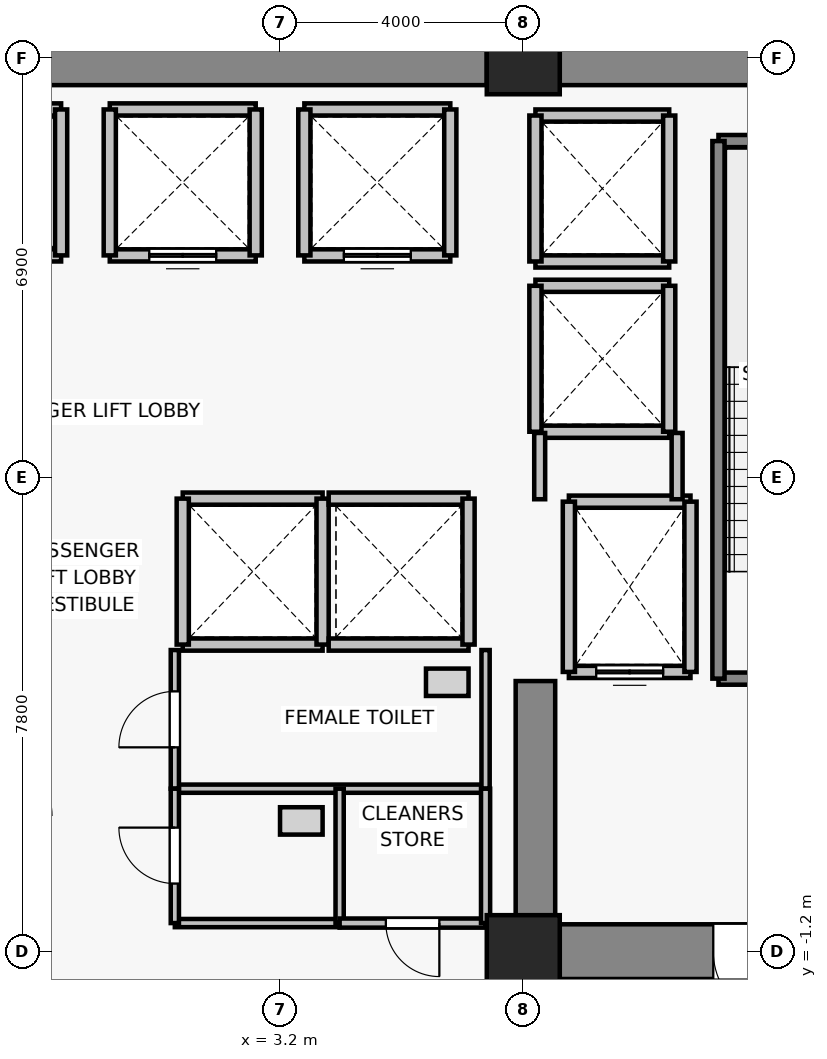
"""IFC4 building model, lengths in metres.
Left out: names, types, materials, properties, quantities, classifications, styles, units other than length and angle.
Written with IfcOpenShell. Run it as: python <this file> out.ifc"""

import sys

from ifc_helpers import new_model, si_unit, direction, frame, frame_2d, origin, origin_2d, place, context, subcontext, project, spatial, rectangle, extrude, source, transform, mapped, element, fill, save


model = new_model("IFC4")
c1 = context("Model", 3, precision=1e-05, world=origin(), true_north=direction((0.0, 1.0)))
c2 = subcontext(c1, "Body", "Model", "MODEL_VIEW")
j1 = project(units=[si_unit("LENGTHUNIT", "METRE"), si_unit("PLANEANGLEUNIT", "RADIAN")], contexts=[c1])
p1 = place(None, origin())
s1 = spatial("IfcSite", under=j1, at=p1, CompositionType="ELEMENT")
p2 = place(p1, origin())
s2 = spatial("IfcBuilding", under=s1, at=p2, CompositionType="ELEMENT")
p3 = place(p2, frame((0.0, 0.0, 18.2)))
s3 = spatial("IfcBuildingStorey", under=s2, at=p3, CompositionType="ELEMENT", Elevation=18.2)
for number, where, z_axis, x_axis in (
    (1, (7.2, -1.2, 0.0), (0.0, 0.0, 1.0), (1.0, 0.0, 0.0)),
    (2, (7.2, 13.5, 0.0), (0.0, 0.0, 1.0), (1.0, 0.0, 0.0)),
):
    element("IfcColumn", number, at=place(p3, frame(where, z_axis=z_axis, x_axis=x_axis)), inside=s3, PredefinedType="COLUMN", context=c2, shape_type="SweptSolid", body=[
        extrude(rectangle(XDim=1.2, YDim=1.2, at=origin_2d()), origin(), (0.0, 0.0, 1.0), 4.4),
    ])
p4 = place(p3, frame((-6.6, 13.5, 0.0), z_axis=(0.0, 0.0, 1.0), x_axis=(1.0, 0.0, 0.0)))
e3 = element("IfcWall", 3, at=p4, inside=s3, PredefinedType="SHEAR", context=c2, shape_type="SweptSolid", body=[
    extrude(rectangle(XDim=13.2, YDim=0.9, at=frame_2d((6.6, 0.0))), origin(), (0.0, 0.0, 1.0), 4.1),
])
p5 = place(p3, frame((7.8, 13.5, 0.0), z_axis=(0.0, 0.0, 1.0), x_axis=(1.0, 0.0, 0.0)))
e4 = element("IfcWall", 4, at=p5, inside=s3, PredefinedType="SHEAR", context=c2, shape_type="SweptSolid", body=[
    extrude(rectangle(XDim=6.0, YDim=0.9, at=frame_2d((3.0, 0.0))), origin(), (0.0, 0.0, 1.0), 4.1),
])
p6 = place(p3, frame((13.8, -1.2, 0.0), z_axis=(0.0, 0.0, 1.0), x_axis=(-1.0, 0.0, 0.0)))
e5 = element("IfcWall", 5, at=p6, inside=s3, PredefinedType="SHEAR", context=c2, shape_type="SweptSolid", body=[
    extrude(rectangle(XDim=6.0, YDim=0.9, at=frame_2d((3.0, 0.0))), origin(), (0.0, 0.0, 1.0), 4.1),
])
p7 = place(p6, frame((2.325, 0.0, 0.0)))
e6 = element("IfcOpeningElement", 6, at=p7, cuts=e5, PredefinedType="OPENING", context=c2, shape_type="SweptSolid", body=[
    extrude(rectangle(XDim=1.15, YDim=2.15, at=frame_2d((0.575, 1.075))), frame((0.0, 0.46, 0.0), z_axis=(0.0, -1.0, 0.0), x_axis=(1.0, 0.0, 0.0)), (0.0, 0.0, 1.0), 0.92),
])
p8 = place(p3, frame((7.4, -0.75, 0.0), z_axis=(0.0, 0.0, 1.0), x_axis=(0.0, 1.0, 0.0)))
e7 = element("IfcWall", 7, at=p8, inside=s3, PredefinedType="SHEAR", context=c2, shape_type="SweptSolid", body=[
    extrude(rectangle(XDim=4.0, YDim=0.65, at=frame_2d((2.0, 0.0))), origin(), (0.0, 0.0, 1.0), 4.1),
])
p9 = place(p3, frame((9.95, 3.4, 0.0), z_axis=(0.0, 0.0, 1.0), x_axis=(-1.0, 0.0, 0.0)))
e8 = element("IfcWall", 8, at=p9, inside=s3, PredefinedType="SOLIDWALL", context=c2, shape_type="SweptSolid", body=[
    extrude(rectangle(XDim=2.0, YDim=0.2, at=frame_2d((1.0, 0.0))), origin(), (0.0, 0.0, 1.0), 4.1),
])
p10 = place(p9, frame((0.45, 0.0, 0.0)))
e9 = element("IfcOpeningElement", 9, at=p10, cuts=e8, PredefinedType="OPENING", context=c2, shape_type="SweptSolid", body=[
    extrude(rectangle(XDim=1.1, YDim=2.2, at=frame_2d((0.55, 1.1))), frame((0.0, 0.11, 0.0), z_axis=(0.0, -1.0, 0.0), x_axis=(1.0, 0.0, 0.0)), (0.0, 0.0, 1.0), 0.22),
])
p11 = place(p3, frame((7.95, 6.2, 0.0), z_axis=(0.0, 0.0, 1.0), x_axis=(1.0, 0.0, 0.0)))
e10 = element("IfcWall", 10, at=p11, inside=s3, PredefinedType="SOLIDWALL", context=c2, shape_type="SweptSolid", body=[
    extrude(rectangle(XDim=2.0, YDim=0.2, at=frame_2d((1.0, 0.0))), origin(), (0.0, 0.0, 1.0), 4.1),
])
for number, where, z_axis, x_axis in (
    (11, (7.95, 3.4, 0.0), (0.0, 0.0, 1.0), (0.0, 1.0, 0.0)),
    (12, (9.95, 6.2, 0.0), (0.0, 0.0, 1.0), (0.0, -1.0, 0.0)),
):
    element("IfcWall", number, at=place(p3, frame(where, z_axis=z_axis, x_axis=x_axis)), inside=s3, PredefinedType="SOLIDWALL", context=c2, shape_type="SweptSolid", body=[
        extrude(rectangle(XDim=2.8, YDim=0.2, at=frame_2d((1.4, 0.0))), origin(), (0.0, 0.0, 1.0), 4.1),
    ])
p12 = place(p3, frame((-0.4, 10.25, 0.0), z_axis=(0.0, 0.0, 1.0), x_axis=(-1.0, 0.0, 0.0)))
e13 = element("IfcWall", 13, at=p12, inside=s3, PredefinedType="SOLIDWALL", context=c2, shape_type="SweptSolid", body=[
    extrude(rectangle(XDim=2.4, YDim=0.2, at=frame_2d((1.2, 0.0))), origin(), (0.0, 0.0, 1.0), 4.1),
])
p13 = place(p12, frame((0.65, 0.0, 0.0)))
e14 = element("IfcOpeningElement", 14, at=p13, cuts=e13, PredefinedType="OPENING", context=c2, shape_type="SweptSolid", body=[
    extrude(rectangle(XDim=1.1, YDim=2.2, at=frame_2d((0.55, 1.1))), frame((0.0, 0.11, 0.0), z_axis=(0.0, -1.0, 0.0), x_axis=(1.0, 0.0, 0.0)), (0.0, 0.0, 1.0), 0.22),
])
p14 = place(p3, frame((-2.8, 12.65, 0.0), z_axis=(0.0, 0.0, 1.0), x_axis=(1.0, 0.0, 0.0)))
e15 = element("IfcWall", 15, at=p14, inside=s3, PredefinedType="SOLIDWALL", context=c2, shape_type="SweptSolid", body=[
    extrude(rectangle(XDim=2.4, YDim=0.2, at=frame_2d((1.2, 0.0))), origin(), (0.0, 0.0, 1.0), 4.1),
])
p15 = place(p3, frame((-0.4, 12.65, 0.0), z_axis=(0.0, 0.0, 1.0), x_axis=(0.0, -1.0, 0.0)))
e16 = element("IfcWall", 16, at=p15, inside=s3, PredefinedType="SOLIDWALL", context=c2, shape_type="SweptSolid", body=[
    extrude(rectangle(XDim=2.4, YDim=0.2, at=frame_2d((1.2, 0.0))), origin(), (0.0, 0.0, 1.0), 4.1),
])
p16 = place(p3, frame((2.8, 10.25, 0.0), z_axis=(0.0, 0.0, 1.0), x_axis=(-1.0, 0.0, 0.0)))
e17 = element("IfcWall", 17, at=p16, inside=s3, PredefinedType="SOLIDWALL", context=c2, shape_type="SweptSolid", body=[
    extrude(rectangle(XDim=2.4, YDim=0.2, at=frame_2d((1.2, 0.0))), origin(), (0.0, 0.0, 1.0), 4.1),
])
p17 = place(p16, frame((0.65, 0.0, 0.0)))
e18 = element("IfcOpeningElement", 18, at=p17, cuts=e17, PredefinedType="OPENING", context=c2, shape_type="SweptSolid", body=[
    extrude(rectangle(XDim=1.1, YDim=2.2, at=frame_2d((0.55, 1.1))), frame((0.0, 0.11, 0.0), z_axis=(0.0, -1.0, 0.0), x_axis=(1.0, 0.0, 0.0)), (0.0, 0.0, 1.0), 0.22),
])
p18 = place(p3, frame((0.4, 12.65, 0.0), z_axis=(0.0, 0.0, 1.0), x_axis=(1.0, 0.0, 0.0)))
e19 = element("IfcWall", 19, at=p18, inside=s3, PredefinedType="SOLIDWALL", context=c2, shape_type="SweptSolid", body=[
    extrude(rectangle(XDim=2.4, YDim=0.2, at=frame_2d((1.2, 0.0))), origin(), (0.0, 0.0, 1.0), 4.1),
])
for number, where, z_axis, x_axis in (
    (20, (0.4, 10.25, 0.0), (0.0, 0.0, 1.0), (0.0, 1.0, 0.0)),
    (21, (2.8, 12.65, 0.0), (0.0, 0.0, 1.0), (0.0, -1.0, 0.0)),
):
    element("IfcWall", number, at=place(p3, frame(where, z_axis=z_axis, x_axis=x_axis)), inside=s3, PredefinedType="SOLIDWALL", context=c2, shape_type="SweptSolid", body=[
        extrude(rectangle(XDim=2.4, YDim=0.2, at=frame_2d((1.2, 0.0))), origin(), (0.0, 0.0, 1.0), 4.1),
    ])
p19 = place(p3, frame((6.0, 10.25, 0.0), z_axis=(0.0, 0.0, 1.0), x_axis=(-1.0, 0.0, 0.0)))
e22 = element("IfcWall", 22, at=p19, inside=s3, PredefinedType="SOLIDWALL", context=c2, shape_type="SweptSolid", body=[
    extrude(rectangle(XDim=2.4, YDim=0.2, at=frame_2d((1.2, 0.0))), origin(), (0.0, 0.0, 1.0), 4.1),
])
p20 = place(p19, frame((0.65, 0.0, 0.0)))
e23 = element("IfcOpeningElement", 23, at=p20, cuts=e22, PredefinedType="OPENING", context=c2, shape_type="SweptSolid", body=[
    extrude(rectangle(XDim=1.1, YDim=2.2, at=frame_2d((0.55, 1.1))), frame((0.0, 0.11, 0.0), z_axis=(0.0, -1.0, 0.0), x_axis=(1.0, 0.0, 0.0)), (0.0, 0.0, 1.0), 0.22),
])
for number, where, z_axis, x_axis in (
    (24, (3.6, 12.65, 0.0), (0.0, 0.0, 1.0), (1.0, 0.0, 0.0)),
    (25, (3.6, 10.25, 0.0), (0.0, 0.0, 1.0), (0.0, 1.0, 0.0)),
    (26, (6.0, 12.65, 0.0), (0.0, 0.0, 1.0), (0.0, -1.0, 0.0)),
):
    element("IfcWall", number, at=place(p3, frame(where, z_axis=z_axis, x_axis=x_axis)), inside=s3, PredefinedType="SOLIDWALL", context=c2, shape_type="SweptSolid", body=[
        extrude(rectangle(XDim=2.4, YDim=0.2, at=frame_2d((1.2, 0.0))), origin(), (0.0, 0.0, 1.0), 4.1),
    ])
for number, where, z_axis, x_axis in (
    (27, (3.9, 3.85, 0.0), (0.0, 0.0, 1.0), (-1.0, 0.0, 0.0)),
    (28, (1.6, 6.25, 0.0), (0.0, 0.0, 1.0), (1.0, 0.0, 0.0)),
):
    element("IfcWall", number, at=place(p3, frame(where, z_axis=z_axis, x_axis=x_axis)), inside=s3, PredefinedType="SOLIDWALL", context=c2, shape_type="SweptSolid", body=[
        extrude(rectangle(XDim=2.3, YDim=0.2, at=frame_2d((1.15, 0.0))), origin(), (0.0, 0.0, 1.0), 4.1),
    ])
for number, where, z_axis, x_axis in (
    (29, (1.6, 3.85, 0.0), (0.0, 0.0, 1.0), (0.0, 1.0, 0.0)),
    (30, (3.9, 6.25, 0.0), (0.0, 0.0, 1.0), (0.0, -1.0, 0.0)),
):
    element("IfcWall", number, at=place(p3, frame(where, z_axis=z_axis, x_axis=x_axis)), inside=s3, PredefinedType="SOLIDWALL", context=c2, shape_type="SweptSolid", body=[
        extrude(rectangle(XDim=2.4, YDim=0.2, at=frame_2d((1.2, 0.0))), origin(), (0.0, 0.0, 1.0), 4.1),
    ])
for number, where, z_axis, x_axis in (
    (31, (6.3, 3.85, 0.0), (0.0, 0.0, 1.0), (-1.0, 0.0, 0.0)),
    (32, (4.0, 6.25, 0.0), (0.0, 0.0, 1.0), (1.0, 0.0, 0.0)),
):
    element("IfcWall", number, at=place(p3, frame(where, z_axis=z_axis, x_axis=x_axis)), inside=s3, PredefinedType="SOLIDWALL", context=c2, shape_type="SweptSolid", body=[
        extrude(rectangle(XDim=2.3, YDim=0.2, at=frame_2d((1.15, 0.0))), origin(), (0.0, 0.0, 1.0), 4.1),
    ])
p21 = place(p3, frame((6.3, 6.25, 0.0), z_axis=(0.0, 0.0, 1.0), x_axis=(0.0, -1.0, 0.0)))
e33 = element("IfcWall", 33, at=p21, inside=s3, PredefinedType="SOLIDWALL", context=c2, shape_type="SweptSolid", body=[
    extrude(rectangle(XDim=2.4, YDim=0.2, at=frame_2d((1.2, 0.0))), origin(), (0.0, 0.0, 1.0), 4.1),
])
for number, where, z_axis, x_axis in (
    (34, (9.6, 7.35, 0.0), (0.0, 0.0, 1.0), (-1.0, 0.0, 0.0)),
    (35, (7.4, 9.75, 0.0), (0.0, 0.0, 1.0), (1.0, 0.0, 0.0)),
):
    element("IfcWall", number, at=place(p3, frame(where, z_axis=z_axis, x_axis=x_axis)), inside=s3, PredefinedType="SOLIDWALL", context=c2, shape_type="SweptSolid", body=[
        extrude(rectangle(XDim=2.2, YDim=0.2, at=frame_2d((1.1, 0.0))), origin(), (0.0, 0.0, 1.0), 3.19),
    ])
p22 = place(p3, frame((7.4, 7.35, 0.0), z_axis=(0.0, 0.0, 1.0), x_axis=(0.0, 1.0, 0.0)))
e36 = element("IfcWall", 36, at=p22, inside=s3, PredefinedType="SOLIDWALL", context=c2, shape_type="SweptSolid", body=[
    extrude(rectangle(XDim=2.4, YDim=0.2, at=frame_2d((1.2, 0.0))), origin(), (0.0, 0.0, 1.0), 3.19),
])
p23 = place(p3, frame((9.6, 9.75, 0.0), z_axis=(0.0, 0.0, 1.0), x_axis=(0.0, -1.0, 0.0)))
e37 = element("IfcWall", 37, at=p23, inside=s3, PredefinedType="SOLIDWALL", context=c2, shape_type="SweptSolid", body=[
    extrude(rectangle(XDim=2.4, YDim=0.2, at=frame_2d((1.2, 0.0))), origin(), (0.0, 0.0, 1.0), 4.1),
])
for number, where, z_axis, x_axis in (
    (38, (9.6, 10.15, 0.0), (0.0, 0.0, 1.0), (-1.0, 0.0, 0.0)),
    (39, (7.4, 12.55, 0.0), (0.0, 0.0, 1.0), (1.0, 0.0, 0.0)),
):
    element("IfcWall", number, at=place(p3, frame(where, z_axis=z_axis, x_axis=x_axis)), inside=s3, PredefinedType="SOLIDWALL", context=c2, shape_type="SweptSolid", body=[
        extrude(rectangle(XDim=2.2, YDim=0.2, at=frame_2d((1.1, 0.0))), origin(), (0.0, 0.0, 1.0), 3.19),
    ])
p24 = place(p3, frame((7.4, 10.15, 0.0), z_axis=(0.0, 0.0, 1.0), x_axis=(0.0, 1.0, 0.0)))
e40 = element("IfcWall", 40, at=p24, inside=s3, PredefinedType="SOLIDWALL", context=c2, shape_type="SweptSolid", body=[
    extrude(rectangle(XDim=2.4, YDim=0.2, at=frame_2d((1.2, 0.0))), origin(), (0.0, 0.0, 1.0), 3.19),
])
p25 = place(p3, frame((9.6, 12.55, 0.0), z_axis=(0.0, 0.0, 1.0), x_axis=(0.0, -1.0, 0.0)))
e41 = element("IfcWall", 41, at=p25, inside=s3, PredefinedType="SOLIDWALL", context=c2, shape_type="SweptSolid", body=[
    extrude(rectangle(XDim=2.4, YDim=0.2, at=frame_2d((1.2, 0.0))), origin(), (0.0, 0.0, 1.0), 4.1),
])
p26 = place(p3, frame((13.93, 3.29, 0.0), z_axis=(0.0, 0.0, 1.0), x_axis=(-1.0, 0.0, 0.0)))
e42 = element("IfcWall", 42, at=p26, inside=s3, PredefinedType="SOLIDWALL", context=c2, shape_type="SweptSolid", body=[
    extrude(rectangle(XDim=3.52, YDim=0.2, at=frame_2d((1.76, 0.0))), origin(), (0.0, 0.0, 1.0), 4.1),
])
p27 = place(p26, frame((1.205, 0.0, 0.0)))
e43 = element("IfcOpeningElement", 43, at=p27, cuts=e42, PredefinedType="OPENING", context=c2, shape_type="SweptSolid", body=[
    extrude(rectangle(XDim=1.15, YDim=2.15, at=frame_2d((0.575, 1.075))), frame((0.0, 0.11, 0.0), z_axis=(0.0, -1.0, 0.0), x_axis=(1.0, 0.0, 0.0)), (0.0, 0.0, 1.0), 0.22),
])
p28 = place(p3, frame((10.41, 12.13, 0.0), z_axis=(0.0, 0.0, 1.0), x_axis=(1.0, 0.0, 0.0)))
e44 = element("IfcWall", 44, at=p28, inside=s3, PredefinedType="SOLIDWALL", context=c2, shape_type="SweptSolid", body=[
    extrude(rectangle(XDim=3.52, YDim=0.2, at=frame_2d((1.76, 0.0))), origin(), (0.0, 0.0, 1.0), 4.1),
])
p29 = place(p3, frame((10.41, 3.29, 0.0), z_axis=(0.0, 0.0, 1.0), x_axis=(0.0, 1.0, 0.0)))
e45 = element("IfcWall", 45, at=p29, inside=s3, PredefinedType="SOLIDWALL", context=c2, shape_type="SweptSolid", body=[
    extrude(rectangle(XDim=8.84, YDim=0.2, at=frame_2d((4.42, 0.0))), origin(), (0.0, 0.0, 1.0), 4.1),
])
p30 = place(p3, frame((7.47, 6.24, 0.0), z_axis=(0.0, 0.0, 1.0), x_axis=(0.0, 1.0, 0.0)))
e46 = element("IfcWall", 46, at=p30, inside=s3, PredefinedType="PARTITIONING", context=c2, shape_type="SweptSolid", body=[
    extrude(rectangle(XDim=1.09, YDim=0.18, at=frame_2d((0.545, 0.0))), origin(), (0.0, 0.0, 1.0), 3.19),
])
p31 = place(p3, frame((9.73, 7.33, 0.0), z_axis=(0.0, 0.0, 1.0), x_axis=(0.0, -1.0, 0.0)))
e47 = element("IfcWall", 47, at=p31, inside=s3, PredefinedType="PARTITIONING", context=c2, shape_type="SweptSolid", body=[
    extrude(rectangle(XDim=1.09, YDim=0.18, at=frame_2d((0.545, 0.0))), origin(), (0.0, 0.0, 1.0), 4.1),
])
p32 = place(p3, frame((6.58, 1.48, 0.0), z_axis=(0.0, 0.0, 1.0), x_axis=(-1.0, 0.0, 0.0)))
e48 = element("IfcWall", 48, at=p32, inside=s3, PredefinedType="PARTITIONING", context=c2, shape_type="SweptSolid", body=[
    extrude(rectangle(XDim=5.11, YDim=0.135, at=frame_2d((2.555, 0.0))), origin(), (0.0, 0.0, 1.0), 4.1),
])
p33 = place(p3, frame((1.47, 1.48, 0.0), z_axis=(0.0, 0.0, 1.0), x_axis=(0.0, 1.0, 0.0)))
e49 = element("IfcWall", 49, at=p33, inside=s3, PredefinedType="PARTITIONING", context=c2, shape_type="SweptSolid", body=[
    extrude(rectangle(XDim=2.28, YDim=0.135, at=frame_2d((1.14, 0.0))), origin(), (0.0, 0.0, 1.0), 3.473),
])
p34 = place(p33, frame((0.68, 0.0, 0.0)))
e50 = element("IfcOpeningElement", 50, at=p34, cuts=e49, PredefinedType="OPENING", context=c2, shape_type="SweptSolid", body=[
    extrude(rectangle(XDim=0.92, YDim=2.1, at=frame_2d((0.46, 1.05))), frame((0.0, 0.077, 0.0), z_axis=(0.0, -1.0, 0.0), x_axis=(1.0, 0.0, 0.0)), (0.0, 0.0, 1.0), 0.155),
])
p35 = place(p3, frame((6.58, 3.76, 0.0), z_axis=(0.0, 0.0, 1.0), x_axis=(0.0, -1.0, 0.0)))
e51 = element("IfcWall", 51, at=p35, inside=s3, PredefinedType="PARTITIONING", context=c2, shape_type="SweptSolid", body=[
    extrude(rectangle(XDim=2.28, YDim=0.135, at=frame_2d((1.14, 0.0))), origin(), (0.0, 0.0, 1.0), 3.473),
])
p36 = place(p3, frame((4.18, -0.73, 0.0), z_axis=(0.0, 0.0, 1.0), x_axis=(-1.0, 0.0, 0.0)))
e52 = element("IfcWall", 52, at=p36, inside=s3, PredefinedType="PARTITIONING", context=c2, shape_type="SweptSolid", body=[
    extrude(rectangle(XDim=2.71, YDim=0.135, at=frame_2d((1.355, 0.0))), origin(), (0.0, 0.0, 1.0), 4.1),
])
p37 = place(p3, frame((1.47, -0.73, 0.0), z_axis=(0.0, 0.0, 1.0), x_axis=(0.0, 1.0, 0.0)))
e53 = element("IfcWall", 53, at=p37, inside=s3, PredefinedType="PARTITIONING", context=c2, shape_type="SweptSolid", body=[
    extrude(rectangle(XDim=2.21, YDim=0.135, at=frame_2d((1.105, 0.0))), origin(), (0.0, 0.0, 1.0), 4.1),
])
p38 = place(p37, frame((0.65, 0.0, 0.0)))
e54 = element("IfcOpeningElement", 54, at=p38, cuts=e53, PredefinedType="OPENING", context=c2, shape_type="SweptSolid", body=[
    extrude(rectangle(XDim=0.92, YDim=2.1, at=frame_2d((0.46, 1.05))), frame((0.0, 0.077, 0.0), z_axis=(0.0, -1.0, 0.0), x_axis=(1.0, 0.0, 0.0)), (0.0, 0.0, 1.0), 0.155),
])
p39 = place(p3, frame((4.18, 1.48, 0.0), z_axis=(0.0, 0.0, 1.0), x_axis=(0.0, -1.0, 0.0)))
e55 = element("IfcWall", 55, at=p39, inside=s3, PredefinedType="PARTITIONING", context=c2, shape_type="SweptSolid", body=[
    extrude(rectangle(XDim=2.21, YDim=0.135, at=frame_2d((1.105, 0.0))), origin(), (0.0, 0.0, 1.0), 4.1),
])
p40 = place(p3, frame((6.58, -0.73, 0.0), z_axis=(0.0, 0.0, 1.0), x_axis=(-1.0, 0.0, 0.0)))
e56 = element("IfcWall", 56, at=p40, inside=s3, PredefinedType="PARTITIONING", context=c2, shape_type="SweptSolid", body=[
    extrude(rectangle(XDim=2.4, YDim=0.15, at=frame_2d((1.2, 0.0))), origin(), (0.0, 0.0, 1.0), 4.1),
])
p41 = place(p40, frame((0.76, 0.0, 0.0)))
e57 = element("IfcOpeningElement", 57, at=p41, cuts=e56, PredefinedType="OPENING", context=c2, shape_type="SweptSolid", body=[
    extrude(rectangle(XDim=0.88, YDim=2.1, at=frame_2d((0.44, 1.05))), frame((0.0, 0.085, 0.0), z_axis=(0.0, -1.0, 0.0), x_axis=(1.0, 0.0, 0.0)), (0.0, 0.0, 1.0), 0.17),
])
p42 = place(p3, frame((6.58, 1.48, 0.0), z_axis=(0.0, 0.0, 1.0), x_axis=(0.0, -1.0, 0.0)))
e58 = element("IfcWall", 58, at=p42, inside=s3, PredefinedType="PARTITIONING", context=c2, shape_type="SweptSolid", body=[
    extrude(rectangle(XDim=2.21, YDim=0.15, at=frame_2d((1.105, 0.0))), origin(), (0.0, 0.0, 1.0), 4.1),
])
m1 = source(origin(), c2, "Body", "SweptSolid", [
    extrude(rectangle(XDim=1.1, YDim=2.2, at=frame_2d((0.55, 1.1))), frame((0.0, 0.025, 0.0), z_axis=(0.0, -1.0, 0.0), x_axis=(1.0, 0.0, 0.0)), (0.0, 0.0, 1.0), 0.05),
])
p43 = place(p10, origin())
e59 = element("IfcDoor", 59, at=p43, inside=s3, OperationType="DOUBLE_DOOR_SLIDING", PredefinedType="DOOR", context=c2, shape_type="MappedRepresentation", body=[
    mapped(m1, transform((0.0, 0.0, 0.0), x_axis=(1.0, 0.0, 0.0), y_axis=(0.0, 1.0, 0.0), z_axis=(0.0, 0.0, 1.0), scale=1.0)),
])
fill(e9, e59)
p44 = place(p17, origin())
e60 = element("IfcDoor", 60, at=p44, inside=s3, OperationType="DOUBLE_DOOR_SLIDING", PredefinedType="DOOR", context=c2, shape_type="MappedRepresentation", body=[
    mapped(m1, transform((0.0, 0.0, 0.0), x_axis=(1.0, 0.0, 0.0), y_axis=(0.0, 1.0, 0.0), z_axis=(0.0, 0.0, 1.0), scale=1.0)),
])
fill(e18, e60)
p45 = place(p20, origin())
e61 = element("IfcDoor", 61, at=p45, inside=s3, OperationType="DOUBLE_DOOR_SLIDING", PredefinedType="DOOR", context=c2, shape_type="MappedRepresentation", body=[
    mapped(m1, transform((0.0, 0.0, 0.0), x_axis=(1.0, 0.0, 0.0), y_axis=(0.0, 1.0, 0.0), z_axis=(0.0, 0.0, 1.0), scale=1.0)),
])
fill(e23, e61)
m2 = source(origin(), c2, "Body", "SweptSolid", [
    extrude(rectangle(XDim=1.15, YDim=2.15, at=frame_2d((0.575, 1.075))), frame((0.0, 0.025, 0.0), z_axis=(0.0, -1.0, 0.0), x_axis=(1.0, 0.0, 0.0)), (0.0, 0.0, 1.0), 0.05),
])
p46 = place(p7, origin())
e62 = element("IfcDoor", 62, at=p46, inside=s3, OperationType="SINGLE_SWING_LEFT", PredefinedType="DOOR", context=c2, shape_type="MappedRepresentation", body=[
    mapped(m2, transform((0.0, 0.0, 0.0), x_axis=(1.0, 0.0, 0.0), y_axis=(0.0, 1.0, 0.0), z_axis=(0.0, 0.0, 1.0), scale=1.0)),
])
fill(e6, e62)
m3 = source(origin(), c2, "Body", "SweptSolid", [
    extrude(rectangle(XDim=0.92, YDim=2.1, at=frame_2d((0.46, 1.05))), frame((0.0, 0.025, 0.0), z_axis=(0.0, -1.0, 0.0), x_axis=(1.0, 0.0, 0.0)), (0.0, 0.0, 1.0), 0.05),
])
p47 = place(p34, origin())
e63 = element("IfcDoor", 63, at=p47, inside=s3, OperationType="SINGLE_SWING_LEFT", PredefinedType="DOOR", context=c2, shape_type="MappedRepresentation", body=[
    mapped(m3, transform((0.0, 0.0, 0.0), x_axis=(1.0, 0.0, 0.0), y_axis=(0.0, 1.0, 0.0), z_axis=(0.0, 0.0, 1.0), scale=1.0)),
])
fill(e50, e63)
p48 = place(p38, origin())
e64 = element("IfcDoor", 64, at=p48, inside=s3, OperationType="SINGLE_SWING_RIGHT", PredefinedType="DOOR", context=c2, shape_type="MappedRepresentation", body=[
    mapped(m3, transform((0.0, 0.0, 0.0), x_axis=(1.0, 0.0, 0.0), y_axis=(0.0, 1.0, 0.0), z_axis=(0.0, 0.0, 1.0), scale=1.0)),
])
fill(e54, e64)
m4 = source(origin(), c2, "Body", "SweptSolid", [
    extrude(rectangle(XDim=0.88, YDim=2.1, at=frame_2d((0.44, 1.05))), frame((0.0, 0.025, 0.0), z_axis=(0.0, -1.0, 0.0), x_axis=(1.0, 0.0, 0.0)), (0.0, 0.0, 1.0), 0.05),
])
p49 = place(p41, origin())
e65 = element("IfcDoor", 65, at=p49, inside=s3, OperationType="SINGLE_SWING_LEFT", PredefinedType="DOOR", context=c2, shape_type="MappedRepresentation", body=[
    mapped(m4, transform((0.0, 0.0, 0.0), x_axis=(1.0, 0.0, 0.0), y_axis=(0.0, 1.0, 0.0), z_axis=(0.0, 0.0, 1.0), scale=1.0)),
])
fill(e57, e65)
save(model, sys.argv[1])
